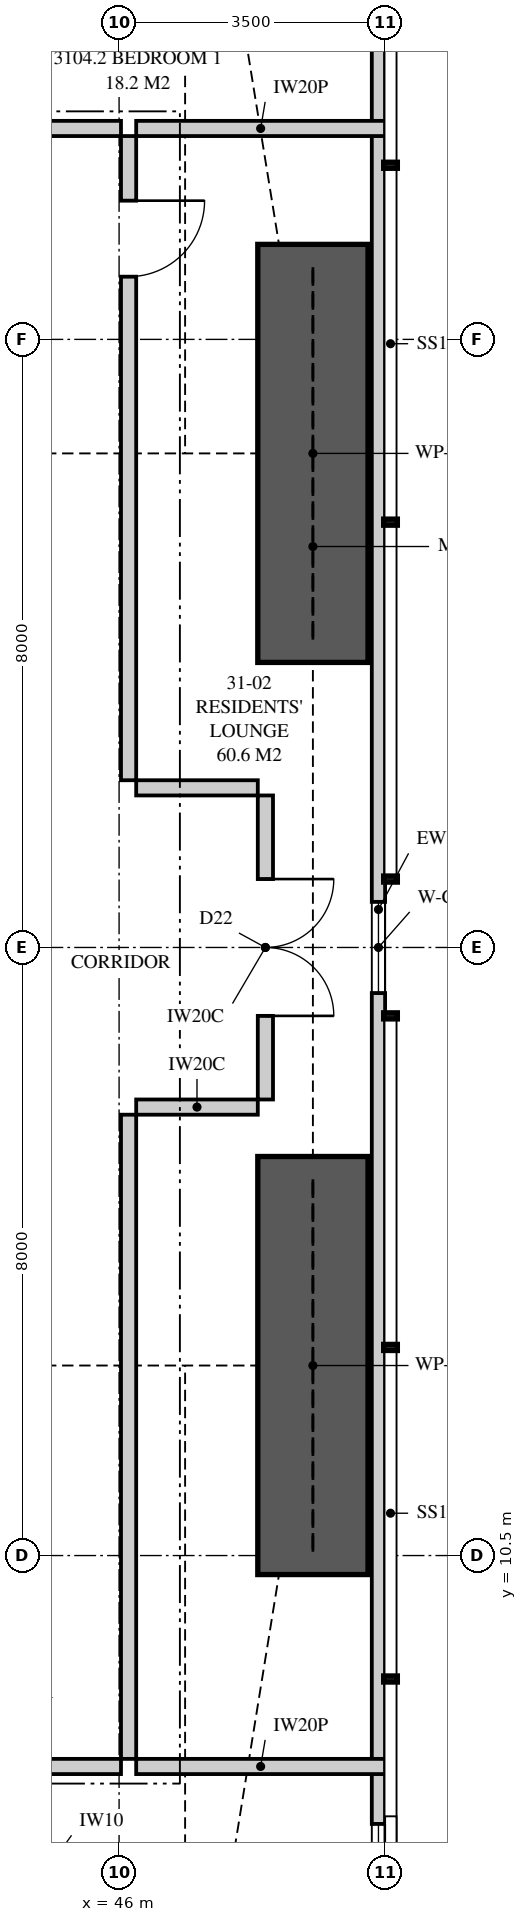
"""IFC4 building model, lengths in metres.
Left out: names, types, materials, properties, quantities, classifications, styles, units other than length and angle.
Written with IfcOpenShell. Run it as: python <this file> out.ifc"""

import sys

from ifc_helpers import new_model, si_unit, direction, frame, frame_2d, origin, place, context, subcontext, project, spatial, polyline, rectangle, outline, extrude, element, fill, save


model = new_model("IFC4")
c1 = context("Model", 3, precision=1e-05, world=origin(), true_north=direction((0.0, 1.0)))
c2 = subcontext(c1, "Body", "Model", "MODEL_VIEW")
j1 = project(units=[si_unit("LENGTHUNIT", "METRE"), si_unit("PLANEANGLEUNIT", "RADIAN")], contexts=[c1])
p1 = place(None, origin())
s1 = spatial("IfcSite", under=j1, at=p1, CompositionType="ELEMENT")
p2 = place(p1, origin())
s2 = spatial("IfcBuilding", under=s1, at=p2, CompositionType="ELEMENT")
p3 = place(p2, frame((0.0, 0.0, 114.9)))
s3 = spatial("IfcBuildingStorey", under=s2, at=p3, CompositionType="ELEMENT", Elevation=114.9)
p4 = place(p3, frame((49.413, 3.051, 0.0), z_axis=(0.0, 0.0, 1.0), x_axis=(0.0, 1.0, 0.0)))
e1 = element("IfcWall", 1, at=p4, inside=s3, PredefinedType="SOLIDWALL", context=c2, shape_type="SweptSolid", body=[
    extrude(outline(polyline([(0.0, 0.0), (31.897, 0.0), (31.897, 3.11), (22.167, 3.11), (22.167, 2.15), (22.074, 2.15), (22.074, 3.11), (21.949, 3.11), (21.949, 2.15), (9.949, 2.15), (9.949, 3.11), (9.823, 3.11), (9.823, 2.15), (9.73, 2.15), (9.73, 3.11), (0.0, 3.11), (0.0, 0.0)])), frame((0.0, 0.087, 0.0), z_axis=(0.0, -1.0, 0.0), x_axis=(1.0, 0.0, 0.0)), (0.0, 0.0, 1.0), 0.175),
])
p5 = place(p4, frame((2.118, 0.0, 0.4)))
e2 = element("IfcOpeningElement", 2, at=p5, cuts=e1, PredefinedType="OPENING", context=c2, shape_type="SweptSolid", body=[
    extrude(rectangle(XDim=1.8, YDim=1.7, at=frame_2d((0.9, 0.85))), frame((0.0, 0.097, 0.0), z_axis=(0.0, -1.0, 0.0), x_axis=(1.0, 0.0, 0.0)), (0.0, 0.0, 1.0), 0.195),
])
p6 = place(p4, frame((14.849, 0.0, 0.4)))
e3 = element("IfcOpeningElement", 3, at=p6, cuts=e1, PredefinedType="OPENING", context=c2, shape_type="SweptSolid", body=[
    extrude(rectangle(XDim=1.2, YDim=1.7, at=frame_2d((0.6, 0.85))), frame((0.0, 0.097, 0.0), z_axis=(0.0, -1.0, 0.0), x_axis=(1.0, 0.0, 0.0)), (0.0, 0.0, 1.0), 0.195),
])
p7 = place(p4, frame((27.479, 0.0, 0.4)))
e4 = element("IfcOpeningElement", 4, at=p7, cuts=e1, PredefinedType="OPENING", context=c2, shape_type="SweptSolid", body=[
    extrude(rectangle(XDim=1.8, YDim=1.7, at=frame_2d((0.9, 0.85))), frame((0.0, 0.097, 0.0), z_axis=(0.0, -1.0, 0.0), x_axis=(1.0, 0.0, 0.0)), (0.0, 0.0, 1.0), 0.195),
])
p8 = place(p3, frame((37.2, 7.725, 0.0), z_axis=(0.0, 0.0, 1.0), x_axis=(1.0, 0.0, 0.0)))
e5 = element("IfcWall", 5, at=p8, inside=s3, PredefinedType="PARTITIONING", context=c2, shape_type="SweptSolid", body=[
    extrude(outline(polyline([(0.0, 0.0), (8.825, 0.0), (8.825, 3.11), (1.762, 3.11), (1.762, 2.541), (1.088, 2.541), (1.088, 3.11), (0.0, 3.11), (0.0, 0.0)])), frame((0.0, 0.1, 0.0), z_axis=(0.0, -1.0, 0.0), x_axis=(1.0, 0.0, 0.0)), (0.0, 0.0, 1.0), 0.2),
])
p9 = place(p8, frame((2.4, 0.0, 0.0)))
e6 = element("IfcOpeningElement", 6, at=p9, cuts=e5, PredefinedType="OPENING", context=c2, shape_type="SweptSolid", body=[
    extrude(rectangle(XDim=1.05, YDim=2.2, at=frame_2d((0.525, 1.1))), frame((0.0, 0.11, 0.0), z_axis=(0.0, -1.0, 0.0), x_axis=(1.0, 0.0, 0.0)), (0.0, 0.0, 1.0), 0.22),
])
p10 = place(p3, frame((46.225, 7.725, 0.0), z_axis=(0.0, 0.0, 1.0), x_axis=(1.0, 0.0, 0.0)))
e7 = element("IfcWall", 7, at=p10, inside=s3, PredefinedType="PARTITIONING", context=c2, shape_type="SweptSolid", body=[
    extrude(outline(polyline([(0.0, 0.0), (3.275, 0.0), (3.275, 3.11), (2.392, 3.11), (2.392, 2.15), (0.643, 2.15), (0.643, 2.541), (0.306, 2.541), (0.306, 3.11), (0.0, 3.11), (0.0, 0.0)])), frame((0.0, 0.1, 0.0), z_axis=(0.0, -1.0, 0.0), x_axis=(1.0, 0.0, 0.0)), (0.0, 0.0, 1.0), 0.2),
])
p11 = place(p3, frame((36.9, 29.275, 0.0), z_axis=(0.0, 0.0, 1.0), x_axis=(1.0, 0.0, 0.0)))
e8 = element("IfcWall", 8, at=p11, inside=s3, PredefinedType="PARTITIONING", context=c2, shape_type="SweptSolid", body=[
    extrude(outline(polyline([(0.0, 0.0), (9.125, 0.0), (9.125, 3.11), (2.062, 3.11), (2.062, 2.541), (1.388, 2.541), (1.388, 3.11), (0.0, 3.11), (0.0, 0.0)])), frame((0.0, 0.1, 0.0), z_axis=(0.0, -1.0, 0.0), x_axis=(1.0, 0.0, 0.0)), (0.0, 0.0, 1.0), 0.2),
])
p12 = place(p11, frame((4.3, 0.0, 0.0)))
e9 = element("IfcOpeningElement", 9, at=p12, cuts=e8, PredefinedType="OPENING", context=c2, shape_type="SweptSolid", body=[
    extrude(rectangle(XDim=1.05, YDim=2.2, at=frame_2d((0.525, 1.1))), frame((0.0, 0.11, 0.0), z_axis=(0.0, -1.0, 0.0), x_axis=(1.0, 0.0, 0.0)), (0.0, 0.0, 1.0), 0.22),
])
p13 = place(p3, frame((46.225, 29.275, 0.0), z_axis=(0.0, 0.0, 1.0), x_axis=(1.0, 0.0, 0.0)))
e10 = element("IfcWall", 10, at=p13, inside=s3, PredefinedType="PARTITIONING", context=c2, shape_type="SweptSolid", body=[
    extrude(outline(polyline([(0.0, 0.0), (3.275, 0.0), (3.275, 3.11), (2.554, 3.11), (2.554, 2.15), (0.805, 2.15), (0.805, 2.541), (0.306, 2.541), (0.306, 3.11), (0.0, 3.11), (0.0, 0.0)])), frame((0.0, 0.1, 0.0), z_axis=(0.0, -1.0, 0.0), x_axis=(1.0, 0.0, 0.0)), (0.0, 0.0, 1.0), 0.2),
])
p14 = place(p3, frame((46.125, 7.825, 0.0), z_axis=(0.0, 0.0, 1.0), x_axis=(0.0, 1.0, 0.0)))
e11 = element("IfcWall", 11, at=p14, inside=s3, PredefinedType="PARTITIONING", context=c2, shape_type="SweptSolid", body=[
    extrude(outline(polyline([(0.0, 0.0), (8.475, 0.0), (8.475, 3.11), (5.512, 3.11), (5.512, 2.541), (4.838, 2.541), (4.838, 3.11), (0.0, 3.11), (0.0, 0.0)])), frame((0.0, 0.1, 0.0), z_axis=(0.0, -1.0, 0.0), x_axis=(1.0, 0.0, 0.0)), (0.0, 0.0, 1.0), 0.2),
])
p15 = place(p3, frame((46.125, 20.7, 0.0), z_axis=(0.0, 0.0, 1.0), x_axis=(0.0, 1.0, 0.0)))
e12 = element("IfcWall", 12, at=p15, inside=s3, PredefinedType="PARTITIONING", context=c2, shape_type="SweptSolid", body=[
    extrude(outline(polyline([(0.0, 0.0), (8.475, 0.0), (8.475, 3.11), (4.637, 3.11), (4.637, 2.541), (3.963, 2.541), (3.963, 3.11), (0.0, 3.11), (0.0, 0.0)])), frame((0.0, 0.1, 0.0), z_axis=(0.0, -1.0, 0.0), x_axis=(1.0, 0.0, 0.0)), (0.0, 0.0, 1.0), 0.2),
])
p16 = place(p15, frame((6.625, 0.0, 0.0)))
e13 = element("IfcOpeningElement", 13, at=p16, cuts=e12, PredefinedType="OPENING", context=c2, shape_type="SweptSolid", body=[
    extrude(rectangle(XDim=1.0, YDim=2.1, at=frame_2d((0.5, 1.05))), frame((0.0, 0.11, 0.0), z_axis=(0.0, -1.0, 0.0), x_axis=(1.0, 0.0, 0.0)), (0.0, 0.0, 1.0), 0.22),
])
p17 = place(p3, frame((47.925, 16.5, 0.0), z_axis=(0.0, 0.0, 1.0), x_axis=(0.0, 1.0, 0.0)))
e14 = element("IfcWall", 14, at=p17, inside=s3, PredefinedType="PARTITIONING", context=c2, shape_type="SweptSolid", body=[
    extrude(outline(polyline([(0.0, 0.0), (4.0, 0.0), (4.0, 3.11), (4.0, 2.15), (0.0, 2.15), (0.0, 3.11), (0.0, 0.0)])), frame((0.0, 0.1, 0.0), z_axis=(0.0, -1.0, 0.0), x_axis=(1.0, 0.0, 0.0)), (0.0, 0.0, 1.0), 0.2),
])
p18 = place(p17, frame((1.1, 0.0, 0.0)))
e15 = element("IfcOpeningElement", 15, at=p18, cuts=e14, PredefinedType="OPENING", context=c2, shape_type="SweptSolid", body=[
    extrude(rectangle(XDim=1.8, YDim=2.1, at=frame_2d((0.9, 1.05))), frame((0.0, 0.11, 0.0), z_axis=(0.0, -1.0, 0.0), x_axis=(1.0, 0.0, 0.0)), (0.0, 0.0, 1.0), 0.22),
])
for number, where, z_axis, x_axis in (
    (16, (46.225, 16.4, 0.0), (0.0, 0.0, 1.0), (1.0, 0.0, 0.0)),
    (17, (46.225, 20.6, 0.0), (0.0, 0.0, 1.0), (1.0, 0.0, 0.0)),
):
    element("IfcWall", number, at=place(p3, frame(where, z_axis=z_axis, x_axis=x_axis)), inside=s3, PredefinedType="PARTITIONING", context=c2, shape_type="SweptSolid", body=[
        extrude(outline(polyline([(0.0, 0.0), (1.6, 0.0), (1.6, 3.11), (1.6, 2.15), (1.415, 2.15), (1.415, 3.11), (0.0, 3.11), (0.0, 0.0)])), frame((0.0, 0.1, 0.0), z_axis=(0.0, -1.0, 0.0), x_axis=(1.0, 0.0, 0.0)), (0.0, 0.0, 1.0), 0.2),
    ])
for number, where, z_axis, x_axis in (
    (18, (48.55, 10.25, 0.0), (0.0, 0.0, 1.0), (0.0, 1.0, 0.0)),
    (19, (48.55, 22.25, 0.0), (0.0, 0.0, 1.0), (0.0, 1.0, 0.0)),
):
    element("IfcWall", number, at=place(p3, frame(where, z_axis=z_axis, x_axis=x_axis)), inside=s3, PredefinedType="SHEAR", context=c2, shape_type="SweptSolid", body=[
        extrude(rectangle(XDim=5.5, YDim=1.45, at=frame_2d((2.75, 0.0))), origin(), (0.0, 0.0, 1.0), 3.35),
    ])
p19 = place(p5, origin())
e20 = element("IfcWindow", 20, at=p19, inside=s3, PartitioningType="SINGLE_PANEL", PredefinedType="WINDOW", context=c2, shape_type="SweptSolid", body=[
    extrude(rectangle(XDim=1.8, YDim=1.7, at=frame_2d((0.9, 0.85))), frame((0.0, 0.03, 0.0), z_axis=(0.0, -1.0, 0.0), x_axis=(1.0, 0.0, 0.0)), (0.0, 0.0, 1.0), 0.06),
])
fill(e2, e20)
p20 = place(p6, origin())
e21 = element("IfcWindow", 21, at=p20, inside=s3, PartitioningType="SINGLE_PANEL", PredefinedType="WINDOW", context=c2, shape_type="SweptSolid", body=[
    extrude(rectangle(XDim=1.2, YDim=1.7, at=frame_2d((0.6, 0.85))), frame((0.0, 0.03, 0.0), z_axis=(0.0, -1.0, 0.0), x_axis=(1.0, 0.0, 0.0)), (0.0, 0.0, 1.0), 0.06),
])
fill(e3, e21)
p21 = place(p18, frame((1.8, 0.0, 0.0), z_axis=(0.0, 0.0, 1.0), x_axis=(-1.0, 0.0, 0.0)))
e22 = element("IfcDoor", 22, at=p21, inside=s3, OperationType="DOUBLE_DOOR_SINGLE_SWING", PredefinedType="DOOR", context=c2, shape_type="SweptSolid", body=[
    extrude(rectangle(XDim=1.8, YDim=2.1, at=frame_2d((0.9, 1.05))), frame((0.0, 0.025, 0.0), z_axis=(0.0, -1.0, 0.0), x_axis=(1.0, 0.0, 0.0)), (0.0, 0.0, 1.0), 0.05),
])
fill(e15, e22)
p22 = place(p16, frame((1.0, 0.0, 0.0), z_axis=(0.0, 0.0, 1.0), x_axis=(-1.0, 0.0, 0.0)))
e23 = element("IfcDoor", 23, at=p22, inside=s3, OperationType="SINGLE_SWING_LEFT", PredefinedType="DOOR", context=c2, shape_type="SweptSolid", body=[
    extrude(rectangle(XDim=1.0, YDim=2.1, at=frame_2d((0.5, 1.05))), frame((0.0, 0.025, 0.0), z_axis=(0.0, -1.0, 0.0), x_axis=(1.0, 0.0, 0.0)), (0.0, 0.0, 1.0), 0.05),
])
fill(e13, e23)
save(model, sys.argv[1])
